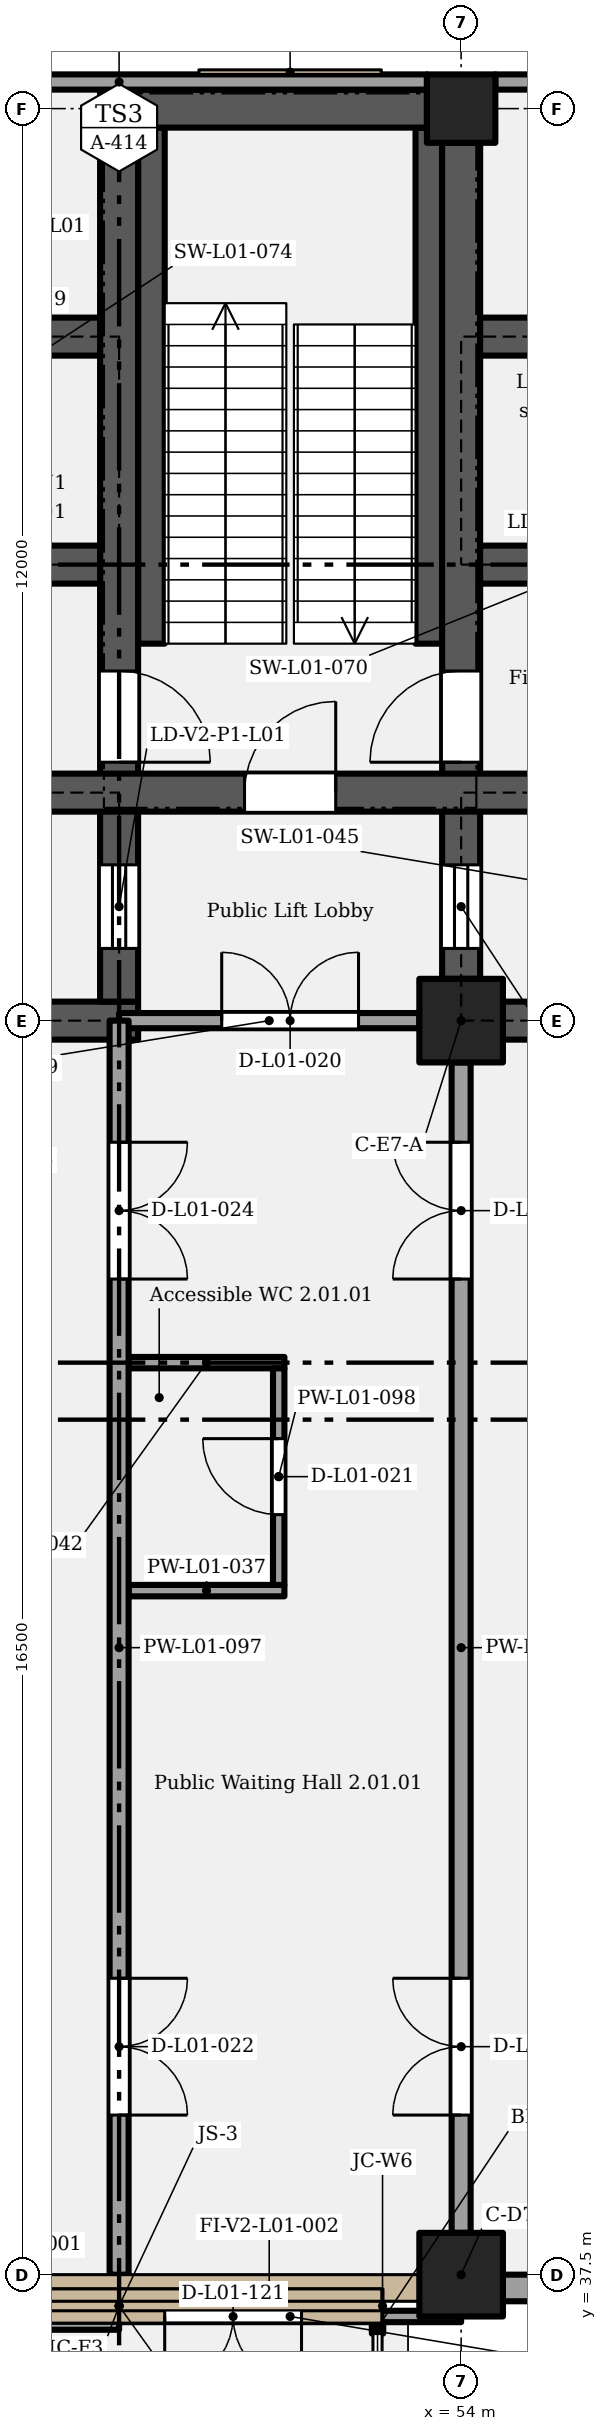
"""IFC4 building model, lengths in metres.
Left out: names, types, materials, properties, quantities, classifications, styles, units other than length and angle.
Written with IfcOpenShell. Run it as: python <this file> out.ifc"""

import sys

from ifc_helpers import new_model, si_unit, direction, frame, frame_2d, origin, origin_2d, place, context, subcontext, project, spatial, rectangle, extrude, element, fill, save


model = new_model("IFC4")
c1 = context("Model", 3, precision=1e-05, world=origin(), true_north=direction((0.0, 1.0)))
c2 = subcontext(c1, "Body", "Model", "MODEL_VIEW")
j1 = project(units=[si_unit("LENGTHUNIT", "METRE"), si_unit("PLANEANGLEUNIT", "RADIAN")], contexts=[c1])
p1 = place(None, origin())
s1 = spatial("IfcSite", under=j1, at=p1, CompositionType="ELEMENT")
p2 = place(p1, origin())
s2 = spatial("IfcBuilding", under=s1, at=p2, CompositionType="ELEMENT")
p3 = place(p2, frame((0.0, 0.0, 6.6)))
s3 = spatial("IfcBuildingStorey", under=s2, at=p3, CompositionType="ELEMENT", Elevation=6.6)
for number, where, z_axis, x_axis in (
    (1, (54.0, 37.5, 0.0), (0.0, 0.0, 1.0), (1.0, 0.0, 0.0)),
    (2, (54.0, 54.0, 0.0), (0.0, 0.0, 1.0), (1.0, 0.0, 0.0)),
):
    element("IfcColumn", number, at=place(p3, frame(where, z_axis=z_axis, x_axis=x_axis)), inside=s3, PredefinedType="COLUMN", context=c2, shape_type="SweptSolid", body=[
        extrude(rectangle(XDim=1.1, YDim=1.1, at=origin_2d()), origin(), (0.0, 0.0, 1.0), 5.4),
    ])
p4 = place(p3, frame((54.0, 66.0, 0.0), z_axis=(0.0, 0.0, 1.0), x_axis=(1.0, 0.0, 0.0)))
e3 = element("IfcColumn", 3, at=p4, inside=s3, PredefinedType="COLUMN", context=c2, shape_type="SweptSolid", body=[
    extrude(rectangle(XDim=0.9, YDim=0.9, at=origin_2d()), origin(), (0.0, 0.0, 1.0), 5.4),
])
p5 = place(p3, frame((46.25, 54.0, 0.0), z_axis=(0.0, 0.0, 1.0), x_axis=(1.0, 0.0, 0.0)))
e4 = element("IfcWall", 4, at=p5, inside=s3, PredefinedType="SHEAR", context=c2, shape_type="SweptSolid", body=[
    extrude(rectangle(XDim=3.5, YDim=0.5, at=frame_2d((1.75, 0.0))), origin(), (0.0, 0.0, 1.0), 5.1),
])
p6 = place(p3, frame((54.55, 54.0, 0.0), z_axis=(0.0, 0.0, 1.0), x_axis=(1.0, 0.0, 0.0)))
e5 = element("IfcWall", 5, at=p6, inside=s3, PredefinedType="SHEAR", context=c2, shape_type="SweptSolid", body=[
    extrude(rectangle(XDim=2.7, YDim=0.5, at=frame_2d((1.35, 0.0))), origin(), (0.0, 0.0, 1.0), 5.1),
])
p7 = place(p3, frame((49.5, 54.25, 0.0), z_axis=(0.0, 0.0, 1.0), x_axis=(0.0, 1.0, 0.0)))
e6 = element("IfcWall", 6, at=p7, inside=s3, PredefinedType="SHEAR", context=c2, shape_type="SweptSolid", body=[
    extrude(rectangle(XDim=11.5, YDim=0.5, at=frame_2d((5.75, 0.0))), origin(), (0.0, 0.0, 1.0), 5.1),
])
p8 = place(p7, frame((0.7, 0.0, 0.0)))
e7 = element("IfcOpeningElement", 7, at=p8, cuts=e6, PredefinedType="OPENING", context=c2, shape_type="SweptSolid", body=[
    extrude(rectangle(XDim=1.1, YDim=2.1, at=frame_2d((0.55, 1.05))), frame((0.0, 0.26, 0.0), z_axis=(0.0, -1.0, 0.0), x_axis=(1.0, 0.0, 0.0)), (0.0, 0.0, 1.0), 0.52),
])
p9 = place(p7, frame((4.35, 0.0, 0.0), z_axis=(0.0, 0.0, 1.0), x_axis=(-1.0, 0.0, 0.0)))
e8 = element("IfcOpeningElement", 8, at=p9, cuts=e6, PredefinedType="OPENING", context=c2, shape_type="SweptSolid", body=[
    extrude(rectangle(XDim=1.2, YDim=2.1, at=frame_2d((0.6, 1.05))), frame((0.0, 0.26, 0.0), z_axis=(0.0, -1.0, 0.0), x_axis=(1.0, 0.0, 0.0)), (0.0, 0.0, 1.0), 0.52),
])
p10 = place(p3, frame((54.0, 54.55, 0.0), z_axis=(0.0, 0.0, 1.0), x_axis=(0.0, 1.0, 0.0)))
e9 = element("IfcWall", 9, at=p10, inside=s3, PredefinedType="SHEAR", context=c2, shape_type="SweptSolid", body=[
    extrude(rectangle(XDim=11.0, YDim=0.5, at=frame_2d((5.5, 0.0))), origin(), (0.0, 0.0, 1.0), 5.1),
])
p11 = place(p10, frame((0.4, 0.0, 0.0)))
e10 = element("IfcOpeningElement", 10, at=p11, cuts=e9, PredefinedType="OPENING", context=c2, shape_type="SweptSolid", body=[
    extrude(rectangle(XDim=1.1, YDim=2.1, at=frame_2d((0.55, 1.05))), frame((0.0, 0.26, 0.0), z_axis=(0.0, -1.0, 0.0), x_axis=(1.0, 0.0, 0.0)), (0.0, 0.0, 1.0), 0.52),
])
p12 = place(p10, frame((2.85, 0.0, 0.0)))
e11 = element("IfcOpeningElement", 11, at=p12, cuts=e9, PredefinedType="OPENING", context=c2, shape_type="SweptSolid", body=[
    extrude(rectangle(XDim=1.2, YDim=2.1, at=frame_2d((0.6, 1.05))), frame((0.0, 0.26, 0.0), z_axis=(0.0, -1.0, 0.0), x_axis=(1.0, 0.0, 0.0)), (0.0, 0.0, 1.0), 0.52),
])
p13 = place(p3, frame((46.25, 57.0, 0.0), z_axis=(0.0, 0.0, 1.0), x_axis=(1.0, 0.0, 0.0)))
e12 = element("IfcWall", 12, at=p13, inside=s3, PredefinedType="SHEAR", context=c2, shape_type="SweptSolid", body=[
    extrude(rectangle(XDim=11.0, YDim=0.5, at=frame_2d((5.5, 0.0))), origin(), (0.0, 0.0, 1.0), 5.1),
])
p14 = place(p13, frame((4.9, 0.0, 0.0)))
e13 = element("IfcOpeningElement", 13, at=p14, cuts=e12, PredefinedType="OPENING", context=c2, shape_type="SweptSolid", body=[
    extrude(rectangle(XDim=1.2, YDim=2.1, at=frame_2d((0.6, 1.05))), frame((0.0, 0.26, 0.0), z_axis=(0.0, -1.0, 0.0), x_axis=(1.0, 0.0, 0.0)), (0.0, 0.0, 1.0), 0.52),
])
p15 = place(p3, frame((46.25, 60.0, 0.0), z_axis=(0.0, 0.0, 1.0), x_axis=(1.0, 0.0, 0.0)))
e14 = element("IfcWall", 14, at=p15, inside=s3, PredefinedType="SHEAR", context=c2, shape_type="SweptSolid", body=[
    extrude(rectangle(XDim=3.0, YDim=0.5, at=frame_2d((1.5, 0.0))), origin(), (0.0, 0.0, 1.0), 5.1),
])
p16 = place(p3, frame((54.25, 60.0, 0.0), z_axis=(0.0, 0.0, 1.0), x_axis=(1.0, 0.0, 0.0)))
e15 = element("IfcWall", 15, at=p16, inside=s3, PredefinedType="SHEAR", context=c2, shape_type="SweptSolid", body=[
    extrude(rectangle(XDim=3.0, YDim=0.5, at=frame_2d((1.5, 0.0))), origin(), (0.0, 0.0, 1.0), 5.1),
])
p17 = place(p16, frame((0.7, 0.0, 0.0)))
e16 = element("IfcOpeningElement", 16, at=p17, cuts=e15, PredefinedType="OPENING", context=c2, shape_type="SweptSolid", body=[
    extrude(rectangle(XDim=1.1, YDim=2.1, at=frame_2d((0.55, 1.05))), frame((0.0, 0.26, 0.0), z_axis=(0.0, -1.0, 0.0), x_axis=(1.0, 0.0, 0.0)), (0.0, 0.0, 1.0), 0.52),
])
for number, where, z_axis, x_axis in (
    (17, (46.25, 63.0, 0.0), (0.0, 0.0, 1.0), (1.0, 0.0, 0.0)),
    (18, (54.25, 63.0, 0.0), (0.0, 0.0, 1.0), (1.0, 0.0, 0.0)),
):
    element("IfcWall", number, at=place(p3, frame(where, z_axis=z_axis, x_axis=x_axis)), inside=s3, PredefinedType="SHEAR", context=c2, shape_type="SweptSolid", body=[
        extrude(rectangle(XDim=3.0, YDim=0.5, at=frame_2d((1.5, 0.0))), origin(), (0.0, 0.0, 1.0), 5.1),
    ])
p18 = place(p3, frame((49.25, 66.0, 0.0), z_axis=(0.0, 0.0, 1.0), x_axis=(1.0, 0.0, 0.0)))
e19 = element("IfcWall", 19, at=p18, inside=s3, PredefinedType="SHEAR", context=c2, shape_type="SweptSolid", body=[
    extrude(rectangle(XDim=4.3, YDim=0.5, at=frame_2d((2.15, 0.0))), origin(), (0.0, 0.0, 1.0), 5.1),
])
p19 = place(p3, frame((54.55, 37.325, 0.0), z_axis=(0.0, 0.0, 1.0), x_axis=(1.0, 0.0, 0.0)))
e20 = element("IfcWall", 20, at=p19, inside=s3, PredefinedType="SOLIDWALL", context=c2, shape_type="SweptSolid", body=[
    extrude(rectangle(XDim=7.9, YDim=0.35, at=frame_2d((3.95, 0.0))), origin(), (0.0, 0.0, 1.0), 5.4),
])
p20 = place(p19, frame((0.95, 0.0, 1.05)))
e21 = element("IfcOpeningElement", 21, at=p20, cuts=e20, PredefinedType="OPENING", context=c2, shape_type="SweptSolid", body=[
    extrude(rectangle(XDim=1.5, YDim=3.75, at=frame_2d((0.75, 1.875))), frame((0.0, 0.185, 0.0), z_axis=(0.0, -1.0, 0.0), x_axis=(1.0, 0.0, 0.0)), (0.0, 0.0, 1.0), 0.37),
])
p21 = place(p19, frame((5.45, 0.0, 1.05)))
e22 = element("IfcOpeningElement", 22, at=p21, cuts=e20, PredefinedType="OPENING", context=c2, shape_type="SweptSolid", body=[
    extrude(rectangle(XDim=1.5, YDim=3.75, at=frame_2d((0.75, 1.875))), frame((0.0, 0.185, 0.0), z_axis=(0.0, -1.0, 0.0), x_axis=(1.0, 0.0, 0.0)), (0.0, 0.0, 1.0), 0.37),
])
p22 = place(p3, frame((45.45, 66.35, 0.0), z_axis=(0.0, 0.0, 1.0), x_axis=(1.0, 0.0, 0.0)))
e23 = element("IfcWall", 23, at=p22, inside=s3, PredefinedType="SOLIDWALL", context=c2, shape_type="SweptSolid", body=[
    extrude(rectangle(XDim=8.1, YDim=0.2, at=frame_2d((4.05, 0.0))), origin(), (0.0, 0.0, 1.0), 5.1),
])
p23 = place(p22, frame((0.6, 0.0, 0.9)))
e24 = element("IfcOpeningElement", 24, at=p23, cuts=e23, PredefinedType="OPENING", context=c2, shape_type="SweptSolid", body=[
    extrude(rectangle(XDim=2.4, YDim=3.3, at=frame_2d((1.2, 1.65))), frame((0.0, 0.11, 0.0), z_axis=(0.0, -1.0, 0.0), x_axis=(1.0, 0.0, 0.0)), (0.0, 0.0, 1.0), 0.22),
])
p24 = place(p3, frame((54.45, 66.35, 0.0), z_axis=(0.0, 0.0, 1.0), x_axis=(1.0, 0.0, 0.0)))
e25 = element("IfcWall", 25, at=p24, inside=s3, PredefinedType="SOLIDWALL", context=c2, shape_type="SweptSolid", body=[
    extrude(rectangle(XDim=8.1, YDim=0.2, at=frame_2d((4.05, 0.0))), origin(), (0.0, 0.0, 1.0), 5.1),
])
p25 = place(p3, frame((45.0, 36.9, 0.0), z_axis=(0.0, 0.0, 1.0), x_axis=(1.0, 0.0, 0.0)))
e26 = element("IfcWall", 26, at=p25, inside=s3, PredefinedType="PARTITIONING", context=c2, shape_type="SweptSolid", body=[
    extrude(rectangle(XDim=4.5, YDim=0.25, at=frame_2d((2.25, 0.0))), origin(), (0.0, 0.0, 1.0), 3.3),
])
p26 = place(p3, frame((49.5, 36.95, 0.0), z_axis=(0.0, 0.0, 1.0), x_axis=(1.0, 0.0, 0.0)))
e27 = element("IfcWall", 27, at=p26, inside=s3, PredefinedType="PARTITIONING", context=c2, shape_type="SweptSolid", body=[
    extrude(rectangle(XDim=4.5, YDim=0.15, at=frame_2d((2.25, 0.0))), origin(), (0.0, 0.0, 1.0), 3.3),
])
p27 = place(p26, frame((2.4, 0.0, 0.0), z_axis=(0.0, 0.0, 1.0), x_axis=(-1.0, 0.0, 0.0)))
e28 = element("IfcOpeningElement", 28, at=p27, cuts=e27, PredefinedType="OPENING", context=c2, shape_type="SweptSolid", body=[
    extrude(rectangle(XDim=1.8, YDim=2.4, at=frame_2d((0.9, 1.2))), frame((0.0, 0.085, 0.0), z_axis=(0.0, -1.0, 0.0), x_axis=(1.0, 0.0, 0.0)), (0.0, 0.0, 1.0), 0.17),
])
for number, where, z_axis, x_axis in (
    (29, (49.625, 46.5, 0.0), (0.0, 0.0, 1.0), (1.0, 0.0, 0.0)),
    (30, (49.625, 49.5, 0.0), (0.0, 0.0, 1.0), (1.0, 0.0, 0.0)),
):
    element("IfcWall", number, at=place(p3, frame(where, z_axis=z_axis, x_axis=x_axis)), inside=s3, PredefinedType="PARTITIONING", context=c2, shape_type="SweptSolid", body=[
        extrude(rectangle(XDim=2.05, YDim=0.15, at=frame_2d((1.025, 0.0))), origin(), (0.0, 0.0, 1.0), 5.1),
    ])
p28 = place(p3, frame((49.5, 54.0, 0.0), z_axis=(0.0, 0.0, 1.0), x_axis=(1.0, 0.0, 0.0)))
e31 = element("IfcWall", 31, at=p28, inside=s3, PredefinedType="PARTITIONING", context=c2, shape_type="SweptSolid", body=[
    extrude(rectangle(XDim=3.95, YDim=0.2, at=frame_2d((1.975, 0.0))), origin(), (0.0, 0.0, 1.0), 4.35),
])
p29 = place(p28, frame((1.35, 0.0, 0.0)))
e32 = element("IfcOpeningElement", 32, at=p29, cuts=e31, PredefinedType="OPENING", context=c2, shape_type="SweptSolid", body=[
    extrude(rectangle(XDim=1.8, YDim=2.1, at=frame_2d((0.9, 1.05))), frame((0.0, 0.11, 0.0), z_axis=(0.0, -1.0, 0.0), x_axis=(1.0, 0.0, 0.0)), (0.0, 0.0, 1.0), 0.22),
])
p30 = place(p3, frame((49.5, 37.5, 0.0), z_axis=(0.0, 0.0, 1.0), x_axis=(0.0, 1.0, 0.0)))
e33 = element("IfcWall", 33, at=p30, inside=s3, PredefinedType="PARTITIONING", context=c2, shape_type="SweptSolid", body=[
    extrude(rectangle(XDim=16.5, YDim=0.25, at=frame_2d((8.25, 0.0))), origin(), (0.0, 0.0, 1.0), 3.95),
])
p31 = place(p30, frame((3.9, 0.0, 0.0), z_axis=(0.0, 0.0, 1.0), x_axis=(-1.0, 0.0, 0.0)))
e34 = element("IfcOpeningElement", 34, at=p31, cuts=e33, PredefinedType="OPENING", context=c2, shape_type="SweptSolid", body=[
    extrude(rectangle(XDim=1.8, YDim=2.4, at=frame_2d((0.9, 1.2))), frame((0.0, 0.135, 0.0), z_axis=(0.0, -1.0, 0.0), x_axis=(1.0, 0.0, 0.0)), (0.0, 0.0, 1.0), 0.27),
])
p32 = place(p30, frame((14.9, 0.0, 0.0), z_axis=(0.0, 0.0, 1.0), x_axis=(-1.0, 0.0, 0.0)))
e35 = element("IfcOpeningElement", 35, at=p32, cuts=e33, PredefinedType="OPENING", context=c2, shape_type="SweptSolid", body=[
    extrude(rectangle(XDim=1.8, YDim=2.4, at=frame_2d((0.9, 1.2))), frame((0.0, 0.135, 0.0), z_axis=(0.0, -1.0, 0.0), x_axis=(1.0, 0.0, 0.0)), (0.0, 0.0, 1.0), 0.27),
])
p33 = place(p3, frame((51.6, 46.575, 0.0), z_axis=(0.0, 0.0, 1.0), x_axis=(0.0, 1.0, 0.0)))
e36 = element("IfcWall", 36, at=p33, inside=s3, PredefinedType="PARTITIONING", context=c2, shape_type="SweptSolid", body=[
    extrude(rectangle(XDim=2.85, YDim=0.15, at=frame_2d((1.425, 0.0))), origin(), (0.0, 0.0, 1.0), 5.1),
])
p34 = place(p33, frame((0.925, 0.0, 0.0)))
e37 = element("IfcOpeningElement", 37, at=p34, cuts=e36, PredefinedType="OPENING", context=c2, shape_type="SweptSolid", body=[
    extrude(rectangle(XDim=1.0, YDim=2.1, at=frame_2d((0.5, 1.05))), frame((0.0, 0.085, 0.0), z_axis=(0.0, -1.0, 0.0), x_axis=(1.0, 0.0, 0.0)), (0.0, 0.0, 1.0), 0.17),
])
p35 = place(p3, frame((54.0, 38.05, 0.0), z_axis=(0.0, 0.0, 1.0), x_axis=(0.0, 1.0, 0.0)))
e38 = element("IfcWall", 38, at=p35, inside=s3, PredefinedType="PARTITIONING", context=c2, shape_type="SweptSolid", body=[
    extrude(rectangle(XDim=15.4, YDim=0.25, at=frame_2d((7.7, 0.0))), origin(), (0.0, 0.0, 1.0), 4.15),
])
p36 = place(p35, frame((1.55, 0.0, 0.0)))
e39 = element("IfcOpeningElement", 39, at=p36, cuts=e38, PredefinedType="OPENING", context=c2, shape_type="SweptSolid", body=[
    extrude(rectangle(XDim=1.8, YDim=2.4, at=frame_2d((0.9, 1.2))), frame((0.0, 0.135, 0.0), z_axis=(0.0, -1.0, 0.0), x_axis=(1.0, 0.0, 0.0)), (0.0, 0.0, 1.0), 0.27),
])
p37 = place(p35, frame((12.55, 0.0, 0.0)))
e40 = element("IfcOpeningElement", 40, at=p37, cuts=e38, PredefinedType="OPENING", context=c2, shape_type="SweptSolid", body=[
    extrude(rectangle(XDim=1.8, YDim=2.4, at=frame_2d((0.9, 1.2))), frame((0.0, 0.135, 0.0), z_axis=(0.0, -1.0, 0.0), x_axis=(1.0, 0.0, 0.0)), (0.0, 0.0, 1.0), 0.27),
])
p38 = place(p3, frame((49.925, 58.96, 0.0), z_axis=(0.0, 0.0, 1.0), x_axis=(0.0, 1.0, 0.0)))
e41 = element("IfcWall", 41, at=p38, inside=s3, PredefinedType="SHEAR", context=c2, shape_type="SweptSolid", body=[
    extrude(rectangle(XDim=6.79, YDim=0.35, at=frame_2d((3.395, 0.0))), origin(), (0.0, 0.0, 1.0), 2.587),
])
p39 = place(p3, frame((53.575, 58.96, 0.0), z_axis=(0.0, 0.0, 1.0), x_axis=(0.0, 1.0, 0.0)))
e42 = element("IfcWall", 42, at=p39, inside=s3, PredefinedType="SHEAR", context=c2, shape_type="SweptSolid", body=[
    extrude(rectangle(XDim=6.79, YDim=0.35, at=frame_2d((3.395, 0.0))), origin(), (0.0, 0.0, 1.0), 5.1),
])
p40 = place(p3, frame((52.9, 36.725, 0.0), z_axis=(0.0, 0.0, 1.0), x_axis=(0.0, 1.0, 0.0)))
e43 = element("IfcWall", 43, at=p40, inside=s3, PredefinedType="SOLIDWALL", context=c2, shape_type="SweptSolid", body=[
    extrude(rectangle(XDim=0.15, YDim=0.15, at=frame_2d((0.075, 0.0))), origin(), (0.0, 0.0, 1.0), 3.3),
])
p41 = place(p27, origin())
e44 = element("IfcDoor", 44, at=p41, inside=s3, OperationType="DOUBLE_DOOR_SINGLE_SWING", PredefinedType="DOOR", context=c2, shape_type="SweptSolid", body=[
    extrude(rectangle(XDim=1.8, YDim=2.4, at=frame_2d((0.9, 1.2))), frame((0.0, 0.025, 0.0), z_axis=(0.0, -1.0, 0.0), x_axis=(1.0, 0.0, 0.0)), (0.0, 0.0, 1.0), 0.05),
])
fill(e28, e44)
p42 = place(p8, origin())
e45 = element("IfcDoor", 45, at=p42, inside=s3, OperationType="SLIDING_TO_LEFT", PredefinedType="DOOR", context=c2, shape_type="SweptSolid", body=[
    extrude(rectangle(XDim=1.1, YDim=2.1, at=frame_2d((0.55, 1.05))), frame((0.0, 0.025, 0.0), z_axis=(0.0, -1.0, 0.0), x_axis=(1.0, 0.0, 0.0)), (0.0, 0.0, 1.0), 0.05),
])
fill(e7, e45)
p43 = place(p11, origin())
e46 = element("IfcDoor", 46, at=p43, inside=s3, OperationType="SLIDING_TO_LEFT", PredefinedType="DOOR", context=c2, shape_type="SweptSolid", body=[
    extrude(rectangle(XDim=1.1, YDim=2.1, at=frame_2d((0.55, 1.05))), frame((0.0, 0.025, 0.0), z_axis=(0.0, -1.0, 0.0), x_axis=(1.0, 0.0, 0.0)), (0.0, 0.0, 1.0), 0.05),
])
fill(e10, e46)
p44 = place(p14, origin())
e47 = element("IfcDoor", 47, at=p44, inside=s3, OperationType="SINGLE_SWING_RIGHT", PredefinedType="DOOR", context=c2, shape_type="SweptSolid", body=[
    extrude(rectangle(XDim=1.2, YDim=2.1, at=frame_2d((0.6, 1.05))), frame((0.0, 0.025, 0.0), z_axis=(0.0, -1.0, 0.0), x_axis=(1.0, 0.0, 0.0)), (0.0, 0.0, 1.0), 0.05),
])
fill(e13, e47)
p45 = place(p12, origin())
e48 = element("IfcDoor", 48, at=p45, inside=s3, OperationType="SINGLE_SWING_LEFT", PredefinedType="DOOR", context=c2, shape_type="SweptSolid", body=[
    extrude(rectangle(XDim=1.2, YDim=2.1, at=frame_2d((0.6, 1.05))), frame((0.0, 0.025, 0.0), z_axis=(0.0, -1.0, 0.0), x_axis=(1.0, 0.0, 0.0)), (0.0, 0.0, 1.0), 0.05),
])
fill(e11, e48)
p46 = place(p9, origin())
e49 = element("IfcDoor", 49, at=p46, inside=s3, OperationType="SINGLE_SWING_RIGHT", PredefinedType="DOOR", context=c2, shape_type="SweptSolid", body=[
    extrude(rectangle(XDim=1.2, YDim=2.1, at=frame_2d((0.6, 1.05))), frame((0.0, 0.025, 0.0), z_axis=(0.0, -1.0, 0.0), x_axis=(1.0, 0.0, 0.0)), (0.0, 0.0, 1.0), 0.05),
])
fill(e8, e49)
p47 = place(p29, origin())
e50 = element("IfcDoor", 50, at=p47, inside=s3, OperationType="DOUBLE_DOOR_SINGLE_SWING", PredefinedType="DOOR", context=c2, shape_type="SweptSolid", body=[
    extrude(rectangle(XDim=1.8, YDim=2.1, at=frame_2d((0.9, 1.05))), frame((0.0, 0.025, 0.0), z_axis=(0.0, -1.0, 0.0), x_axis=(1.0, 0.0, 0.0)), (0.0, 0.0, 1.0), 0.05),
])
fill(e32, e50)
p48 = place(p34, origin())
e51 = element("IfcDoor", 51, at=p48, inside=s3, OperationType="SINGLE_SWING_RIGHT", PredefinedType="DOOR", context=c2, shape_type="SweptSolid", body=[
    extrude(rectangle(XDim=1.0, YDim=2.1, at=frame_2d((0.5, 1.05))), frame((0.0, 0.025, 0.0), z_axis=(0.0, -1.0, 0.0), x_axis=(1.0, 0.0, 0.0)), (0.0, 0.0, 1.0), 0.05),
])
fill(e37, e51)
p49 = place(p31, origin())
e52 = element("IfcDoor", 52, at=p49, inside=s3, OperationType="DOUBLE_DOOR_SINGLE_SWING", PredefinedType="DOOR", context=c2, shape_type="SweptSolid", body=[
    extrude(rectangle(XDim=1.8, YDim=2.4, at=frame_2d((0.9, 1.2))), frame((0.0, 0.025, 0.0), z_axis=(0.0, -1.0, 0.0), x_axis=(1.0, 0.0, 0.0)), (0.0, 0.0, 1.0), 0.05),
])
fill(e34, e52)
p50 = place(p36, origin())
e53 = element("IfcDoor", 53, at=p50, inside=s3, OperationType="DOUBLE_DOOR_SINGLE_SWING", PredefinedType="DOOR", context=c2, shape_type="SweptSolid", body=[
    extrude(rectangle(XDim=1.8, YDim=2.4, at=frame_2d((0.9, 1.2))), frame((0.0, 0.025, 0.0), z_axis=(0.0, -1.0, 0.0), x_axis=(1.0, 0.0, 0.0)), (0.0, 0.0, 1.0), 0.05),
])
fill(e39, e53)
p51 = place(p32, origin())
e54 = element("IfcDoor", 54, at=p51, inside=s3, OperationType="DOUBLE_DOOR_SINGLE_SWING", PredefinedType="DOOR", context=c2, shape_type="SweptSolid", body=[
    extrude(rectangle(XDim=1.8, YDim=2.4, at=frame_2d((0.9, 1.2))), frame((0.0, 0.025, 0.0), z_axis=(0.0, -1.0, 0.0), x_axis=(1.0, 0.0, 0.0)), (0.0, 0.0, 1.0), 0.05),
])
fill(e35, e54)
p52 = place(p37, origin())
e55 = element("IfcDoor", 55, at=p52, inside=s3, OperationType="DOUBLE_DOOR_SINGLE_SWING", PredefinedType="DOOR", context=c2, shape_type="SweptSolid", body=[
    extrude(rectangle(XDim=1.8, YDim=2.4, at=frame_2d((0.9, 1.2))), frame((0.0, 0.025, 0.0), z_axis=(0.0, -1.0, 0.0), x_axis=(1.0, 0.0, 0.0)), (0.0, 0.0, 1.0), 0.05),
])
fill(e40, e55)
save(model, sys.argv[1])
